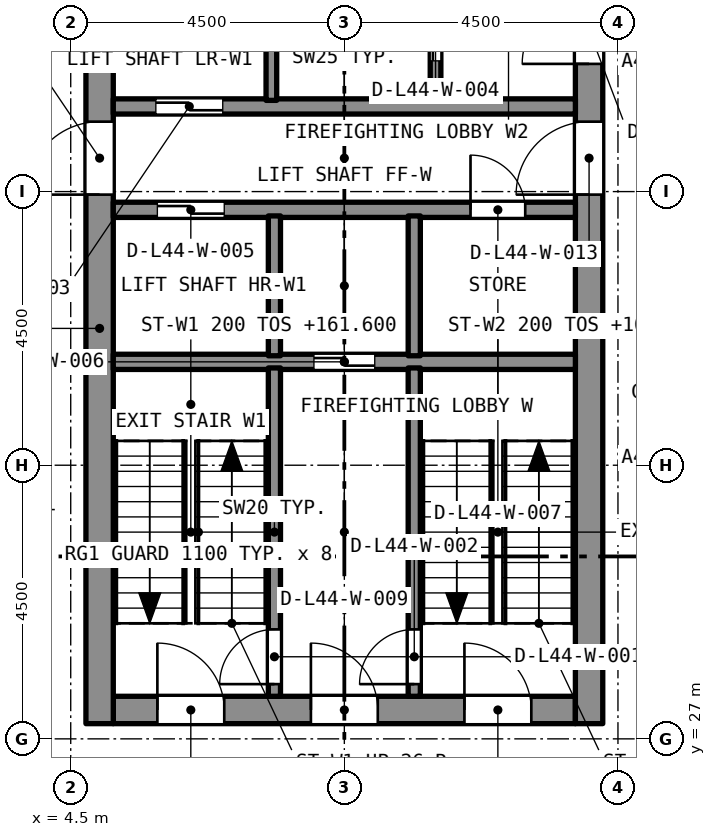
"""IFC4 building model, lengths in metres.
Left out: names, types, materials, properties, quantities, classifications, styles, units other than length and angle.
Written with IfcOpenShell. Run it as: python <this file> out.ifc"""

import sys

from ifc_helpers import new_model, si_unit, direction, frame, frame_2d, origin, place, context, subcontext, project, spatial, rectangle, extrude, element, fill, save


model = new_model("IFC4")
c1 = context("Model", 3, precision=1e-05, world=origin(), true_north=direction((0.0, 1.0)))
c2 = subcontext(c1, "Body", "Model", "MODEL_VIEW")
j1 = project(units=[si_unit("LENGTHUNIT", "METRE"), si_unit("PLANEANGLEUNIT", "RADIAN")], contexts=[c1])
p1 = place(None, origin())
s1 = spatial("IfcSite", under=j1, at=p1, CompositionType="ELEMENT")
p2 = place(p1, origin())
s2 = spatial("IfcBuilding", under=s1, at=p2, CompositionType="ELEMENT")
p3 = place(p2, frame((0.0, 0.0, 159.4)))
s3 = spatial("IfcBuildingStorey", under=s2, at=p3, CompositionType="ELEMENT", Elevation=159.4)
p4 = place(p3, frame((5.2, 27.475, 0.0), z_axis=(0.0, 0.0, 1.0), x_axis=(1.0, 0.0, 0.0)))
e1 = element("IfcWall", 1, at=p4, inside=s3, PredefinedType="SOLIDWALL", context=c2, shape_type="SweptSolid", body=[
    extrude(rectangle(XDim=7.6, YDim=0.45, at=frame_2d((3.8, 0.0))), origin(), (0.0, 0.0, 1.0), 4.4),
])
p5 = place(p4, frame((0.725, 0.0, 0.0)))
e2 = element("IfcOpeningElement", 2, at=p5, cuts=e1, PredefinedType="OPENING", context=c2, shape_type="SweptSolid", body=[
    extrude(rectangle(XDim=1.1, YDim=2.1, at=frame_2d((0.55, 1.05))), frame((0.0, 0.235, 0.0), z_axis=(0.0, -1.0, 0.0), x_axis=(1.0, 0.0, 0.0)), (0.0, 0.0, 1.0), 0.47),
])
p6 = place(p4, frame((3.25, 0.0, 0.0)))
e3 = element("IfcOpeningElement", 3, at=p6, cuts=e1, PredefinedType="OPENING", context=c2, shape_type="SweptSolid", body=[
    extrude(rectangle(XDim=1.1, YDim=2.1, at=frame_2d((0.55, 1.05))), frame((0.0, 0.235, 0.0), z_axis=(0.0, -1.0, 0.0), x_axis=(1.0, 0.0, 0.0)), (0.0, 0.0, 1.0), 0.47),
])
p7 = place(p4, frame((5.775, 0.0, 0.0)))
e4 = element("IfcOpeningElement", 4, at=p7, cuts=e1, PredefinedType="OPENING", context=c2, shape_type="SweptSolid", body=[
    extrude(rectangle(XDim=1.1, YDim=2.1, at=frame_2d((0.55, 1.05))), frame((0.0, 0.235, 0.0), z_axis=(0.0, -1.0, 0.0), x_axis=(1.0, 0.0, 0.0)), (0.0, 0.0, 1.0), 0.47),
])
p8 = place(p3, frame((4.975, 27.25, 0.0), z_axis=(0.0, 0.0, 1.0), x_axis=(0.0, 1.0, 0.0)))
e5 = element("IfcWall", 5, at=p8, inside=s3, PredefinedType="SOLIDWALL", context=c2, shape_type="SweptSolid", body=[
    extrude(rectangle(XDim=13.0, YDim=0.45, at=frame_2d((6.5, 0.0))), origin(), (0.0, 0.0, 1.0), 4.4),
])
p9 = place(p8, frame((8.7, 0.0, 0.0)))
e6 = element("IfcOpeningElement", 6, at=p9, cuts=e5, PredefinedType="OPENING", context=c2, shape_type="SweptSolid", body=[
    extrude(rectangle(XDim=1.2, YDim=2.1, at=frame_2d((0.6, 1.05))), frame((0.0, 0.235, 0.0), z_axis=(0.0, -1.0, 0.0), x_axis=(1.0, 0.0, 0.0)), (0.0, 0.0, 1.0), 0.47),
])
p10 = place(p3, frame((13.025, 27.25, 0.0), z_axis=(0.0, 0.0, 1.0), x_axis=(0.0, 1.0, 0.0)))
e7 = element("IfcWall", 7, at=p10, inside=s3, PredefinedType="SOLIDWALL", context=c2, shape_type="SweptSolid", body=[
    extrude(rectangle(XDim=13.0, YDim=0.45, at=frame_2d((6.5, 0.0))), origin(), (0.0, 0.0, 1.0), 4.4),
])
p11 = place(p10, frame((10.85, 0.0, 0.0)))
e8 = element("IfcOpeningElement", 8, at=p11, cuts=e7, PredefinedType="OPENING", context=c2, shape_type="SweptSolid", body=[
    extrude(rectangle(XDim=1.1, YDim=2.1, at=frame_2d((0.55, 1.05))), frame((0.0, 0.235, 0.0), z_axis=(0.0, -1.0, 0.0), x_axis=(1.0, 0.0, 0.0)), (0.0, 0.0, 1.0), 0.47),
])
p12 = place(p10, frame((8.7, 0.0, 0.0)))
e9 = element("IfcOpeningElement", 9, at=p12, cuts=e7, PredefinedType="OPENING", context=c2, shape_type="SweptSolid", body=[
    extrude(rectangle(XDim=1.2, YDim=2.1, at=frame_2d((0.6, 1.05))), frame((0.0, 0.235, 0.0), z_axis=(0.0, -1.0, 0.0), x_axis=(1.0, 0.0, 0.0)), (0.0, 0.0, 1.0), 0.47),
])
p13 = place(p3, frame((5.2, 33.2, 0.0), z_axis=(0.0, 0.0, 1.0), x_axis=(1.0, 0.0, 0.0)))
e10 = element("IfcWall", 10, at=p13, inside=s3, PredefinedType="SOLIDWALL", context=c2, shape_type="SweptSolid", body=[
    extrude(rectangle(XDim=7.6, YDim=0.25, at=frame_2d((3.8, 0.0))), origin(), (0.0, 0.0, 1.0), 4.1),
])
p14 = place(p13, frame((3.3, 0.0, 0.0)))
e11 = element("IfcOpeningElement", 11, at=p14, cuts=e10, PredefinedType="OPENING", context=c2, shape_type="SweptSolid", body=[
    extrude(rectangle(XDim=1.0, YDim=2.1, at=frame_2d((0.5, 1.05))), frame((0.0, 0.135, 0.0), z_axis=(0.0, -1.0, 0.0), x_axis=(1.0, 0.0, 0.0)), (0.0, 0.0, 1.0), 0.27),
])
p15 = place(p3, frame((5.2, 35.7, 0.0), z_axis=(0.0, 0.0, 1.0), x_axis=(1.0, 0.0, 0.0)))
e12 = element("IfcWall", 12, at=p15, inside=s3, PredefinedType="SOLIDWALL", context=c2, shape_type="SweptSolid", body=[
    extrude(rectangle(XDim=7.6, YDim=0.25, at=frame_2d((3.8, 0.0))), origin(), (0.0, 0.0, 1.0), 4.1),
])
p16 = place(p15, frame((0.725, 0.0, 0.0)))
e13 = element("IfcOpeningElement", 13, at=p16, cuts=e12, PredefinedType="OPENING", context=c2, shape_type="SweptSolid", body=[
    extrude(rectangle(XDim=1.1, YDim=2.4, at=frame_2d((0.55, 1.2))), frame((0.0, 0.135, 0.0), z_axis=(0.0, -1.0, 0.0), x_axis=(1.0, 0.0, 0.0)), (0.0, 0.0, 1.0), 0.27),
])
p17 = place(p15, frame((5.875, 0.0, 0.0)))
e14 = element("IfcOpeningElement", 14, at=p17, cuts=e12, PredefinedType="OPENING", context=c2, shape_type="SweptSolid", body=[
    extrude(rectangle(XDim=0.9, YDim=2.1, at=frame_2d((0.45, 1.05))), frame((0.0, 0.135, 0.0), z_axis=(0.0, -1.0, 0.0), x_axis=(1.0, 0.0, 0.0)), (0.0, 0.0, 1.0), 0.27),
])
p18 = place(p3, frame((5.2, 37.4, 0.0), z_axis=(0.0, 0.0, 1.0), x_axis=(1.0, 0.0, 0.0)))
e15 = element("IfcWall", 15, at=p18, inside=s3, PredefinedType="SOLIDWALL", context=c2, shape_type="SweptSolid", body=[
    extrude(rectangle(XDim=7.6, YDim=0.25, at=frame_2d((3.8, 0.0))), origin(), (0.0, 0.0, 1.0), 4.1),
])
p19 = place(p18, frame((0.7, 0.0, 0.0)))
e16 = element("IfcOpeningElement", 16, at=p19, cuts=e15, PredefinedType="OPENING", context=c2, shape_type="SweptSolid", body=[
    extrude(rectangle(XDim=1.1, YDim=2.4, at=frame_2d((0.55, 1.2))), frame((0.0, 0.135, 0.0), z_axis=(0.0, -1.0, 0.0), x_axis=(1.0, 0.0, 0.0)), (0.0, 0.0, 1.0), 0.27),
])
p20 = place(p3, frame((7.85, 27.7, 0.0), z_axis=(0.0, 0.0, 1.0), x_axis=(0.0, 1.0, 0.0)))
e17 = element("IfcWall", 17, at=p20, inside=s3, PredefinedType="SOLIDWALL", context=c2, shape_type="SweptSolid", body=[
    extrude(rectangle(XDim=5.4, YDim=0.2, at=frame_2d((2.7, 0.0))), origin(), (0.0, 0.0, 1.0), 4.1),
])
p21 = place(p20, frame((0.2, 0.0, 0.0)))
e18 = element("IfcOpeningElement", 18, at=p21, cuts=e17, PredefinedType="OPENING", context=c2, shape_type="SweptSolid", body=[
    extrude(rectangle(XDim=0.9, YDim=2.1, at=frame_2d((0.45, 1.05))), frame((0.0, 0.11, 0.0), z_axis=(0.0, -1.0, 0.0), x_axis=(1.0, 0.0, 0.0)), (0.0, 0.0, 1.0), 0.22),
])
p22 = place(p3, frame((10.15, 27.7, 0.0), z_axis=(0.0, 0.0, 1.0), x_axis=(0.0, 1.0, 0.0)))
e19 = element("IfcWall", 19, at=p22, inside=s3, PredefinedType="SOLIDWALL", context=c2, shape_type="SweptSolid", body=[
    extrude(rectangle(XDim=5.4, YDim=0.2, at=frame_2d((2.7, 0.0))), origin(), (0.0, 0.0, 1.0), 4.1),
])
p23 = place(p22, frame((0.2, 0.0, 0.0)))
e20 = element("IfcOpeningElement", 20, at=p23, cuts=e19, PredefinedType="OPENING", context=c2, shape_type="SweptSolid", body=[
    extrude(rectangle(XDim=0.9, YDim=2.1, at=frame_2d((0.45, 1.05))), frame((0.0, 0.11, 0.0), z_axis=(0.0, -1.0, 0.0), x_axis=(1.0, 0.0, 0.0)), (0.0, 0.0, 1.0), 0.22),
])
for number, where, z_axis, x_axis in (
    (21, (7.85, 33.3, 0.0), (0.0, 0.0, 1.0), (0.0, 1.0, 0.0)),
    (22, (10.15, 33.3, 0.0), (0.0, 0.0, 1.0), (0.0, 1.0, 0.0)),
):
    element("IfcWall", number, at=place(p3, frame(where, z_axis=z_axis, x_axis=x_axis)), inside=s3, PredefinedType="SOLIDWALL", context=c2, shape_type="SweptSolid", body=[
        extrude(rectangle(XDim=2.3, YDim=0.2, at=frame_2d((1.15, 0.0))), origin(), (0.0, 0.0, 1.0), 4.1),
    ])
p24 = place(p3, frame((7.8, 37.5, 0.0), z_axis=(0.0, 0.0, 1.0), x_axis=(0.0, 1.0, 0.0)))
e23 = element("IfcWall", 23, at=p24, inside=s3, PredefinedType="SOLIDWALL", context=c2, shape_type="SweptSolid", body=[
    extrude(rectangle(XDim=2.3, YDim=0.175, at=frame_2d((1.15, 0.0))), origin(), (0.0, 0.0, 1.0), 4.1),
])
p25 = place(p3, frame((10.5, 37.5, 0.0), z_axis=(0.0, 0.0, 1.0), x_axis=(0.0, 1.0, 0.0)))
e24 = element("IfcWall", 24, at=p25, inside=s3, PredefinedType="SOLIDWALL", context=c2, shape_type="SweptSolid", body=[
    extrude(rectangle(XDim=2.3, YDim=0.175, at=frame_2d((1.15, 0.0))), origin(), (0.0, 0.0, 1.0), 4.1),
])
p26 = place(p25, frame((0.65, 0.0, 0.0)))
e25 = element("IfcOpeningElement", 25, at=p26, cuts=e24, PredefinedType="OPENING", context=c2, shape_type="SweptSolid", body=[
    extrude(rectangle(XDim=1.0, YDim=2.1, at=frame_2d((0.5, 1.05))), frame((0.0, 0.097, 0.0), z_axis=(0.0, -1.0, 0.0), x_axis=(1.0, 0.0, 0.0)), (0.0, 0.0, 1.0), 0.195),
])
p27 = place(p21, origin())
e26 = element("IfcDoor", 26, at=p27, inside=s3, OperationType="SINGLE_SWING_LEFT", PredefinedType="DOOR", context=c2, shape_type="SweptSolid", body=[
    extrude(rectangle(XDim=0.9, YDim=2.1, at=frame_2d((0.45, 1.05))), frame((0.0, 0.025, 0.0), z_axis=(0.0, -1.0, 0.0), x_axis=(1.0, 0.0, 0.0)), (0.0, 0.0, 1.0), 0.05),
])
fill(e18, e26)
p28 = place(p23, origin())
e27 = element("IfcDoor", 27, at=p28, inside=s3, OperationType="SINGLE_SWING_LEFT", PredefinedType="DOOR", context=c2, shape_type="SweptSolid", body=[
    extrude(rectangle(XDim=0.9, YDim=2.1, at=frame_2d((0.45, 1.05))), frame((0.0, 0.025, 0.0), z_axis=(0.0, -1.0, 0.0), x_axis=(1.0, 0.0, 0.0)), (0.0, 0.0, 1.0), 0.05),
])
fill(e20, e27)
p29 = place(p19, origin())
e28 = element("IfcDoor", 28, at=p29, inside=s3, OperationType="SLIDING_TO_LEFT", PredefinedType="DOOR", context=c2, shape_type="SweptSolid", body=[
    extrude(rectangle(XDim=1.1, YDim=2.4, at=frame_2d((0.55, 1.2))), frame((0.0, 0.025, 0.0), z_axis=(0.0, -1.0, 0.0), x_axis=(1.0, 0.0, 0.0)), (0.0, 0.0, 1.0), 0.05),
])
fill(e16, e28)
p30 = place(p26, origin())
e29 = element("IfcDoor", 29, at=p30, inside=s3, OperationType="SLIDING_TO_LEFT", PredefinedType="DOOR", context=c2, shape_type="SweptSolid", body=[
    extrude(rectangle(XDim=1.0, YDim=2.1, at=frame_2d((0.5, 1.05))), frame((0.0, 0.025, 0.0), z_axis=(0.0, -1.0, 0.0), x_axis=(1.0, 0.0, 0.0)), (0.0, 0.0, 1.0), 0.05),
])
fill(e25, e29)
p31 = place(p16, origin())
e30 = element("IfcDoor", 30, at=p31, inside=s3, OperationType="SLIDING_TO_LEFT", PredefinedType="DOOR", context=c2, shape_type="SweptSolid", body=[
    extrude(rectangle(XDim=1.1, YDim=2.4, at=frame_2d((0.55, 1.2))), frame((0.0, 0.025, 0.0), z_axis=(0.0, -1.0, 0.0), x_axis=(1.0, 0.0, 0.0)), (0.0, 0.0, 1.0), 0.05),
])
fill(e13, e30)
p32 = place(p14, origin())
e31 = element("IfcDoor", 31, at=p32, inside=s3, OperationType="SLIDING_TO_LEFT", PredefinedType="DOOR", context=c2, shape_type="SweptSolid", body=[
    extrude(rectangle(XDim=1.0, YDim=2.1, at=frame_2d((0.5, 1.05))), frame((0.0, 0.025, 0.0), z_axis=(0.0, -1.0, 0.0), x_axis=(1.0, 0.0, 0.0)), (0.0, 0.0, 1.0), 0.05),
])
fill(e11, e31)
p33 = place(p17, origin())
e32 = element("IfcDoor", 32, at=p33, inside=s3, OperationType="SINGLE_SWING_LEFT", PredefinedType="DOOR", context=c2, shape_type="SweptSolid", body=[
    extrude(rectangle(XDim=0.9, YDim=2.1, at=frame_2d((0.45, 1.05))), frame((0.0, 0.025, 0.0), z_axis=(0.0, -1.0, 0.0), x_axis=(1.0, 0.0, 0.0)), (0.0, 0.0, 1.0), 0.05),
])
fill(e14, e32)
p34 = place(p5, origin())
e33 = element("IfcDoor", 33, at=p34, inside=s3, OperationType="SINGLE_SWING_LEFT", PredefinedType="DOOR", context=c2, shape_type="SweptSolid", body=[
    extrude(rectangle(XDim=1.1, YDim=2.1, at=frame_2d((0.55, 1.05))), frame((0.0, 0.025, 0.0), z_axis=(0.0, -1.0, 0.0), x_axis=(1.0, 0.0, 0.0)), (0.0, 0.0, 1.0), 0.05),
])
fill(e2, e33)
p35 = place(p6, origin())
e34 = element("IfcDoor", 34, at=p35, inside=s3, OperationType="SINGLE_SWING_LEFT", PredefinedType="DOOR", context=c2, shape_type="SweptSolid", body=[
    extrude(rectangle(XDim=1.1, YDim=2.1, at=frame_2d((0.55, 1.05))), frame((0.0, 0.025, 0.0), z_axis=(0.0, -1.0, 0.0), x_axis=(1.0, 0.0, 0.0)), (0.0, 0.0, 1.0), 0.05),
])
fill(e3, e34)
p36 = place(p7, origin())
e35 = element("IfcDoor", 35, at=p36, inside=s3, OperationType="SINGLE_SWING_LEFT", PredefinedType="DOOR", context=c2, shape_type="SweptSolid", body=[
    extrude(rectangle(XDim=1.1, YDim=2.1, at=frame_2d((0.55, 1.05))), frame((0.0, 0.025, 0.0), z_axis=(0.0, -1.0, 0.0), x_axis=(1.0, 0.0, 0.0)), (0.0, 0.0, 1.0), 0.05),
])
fill(e4, e35)
p37 = place(p11, origin())
e36 = element("IfcDoor", 36, at=p37, inside=s3, OperationType="SINGLE_SWING_LEFT", PredefinedType="DOOR", context=c2, shape_type="SweptSolid", body=[
    extrude(rectangle(XDim=1.1, YDim=2.1, at=frame_2d((0.55, 1.05))), frame((0.0, 0.025, 0.0), z_axis=(0.0, -1.0, 0.0), x_axis=(1.0, 0.0, 0.0)), (0.0, 0.0, 1.0), 0.05),
])
fill(e8, e36)
p38 = place(p9, origin())
e37 = element("IfcDoor", 37, at=p38, inside=s3, OperationType="SINGLE_SWING_LEFT", PredefinedType="DOOR", context=c2, shape_type="SweptSolid", body=[
    extrude(rectangle(XDim=1.2, YDim=2.1, at=frame_2d((0.6, 1.05))), frame((0.0, 0.025, 0.0), z_axis=(0.0, -1.0, 0.0), x_axis=(1.0, 0.0, 0.0)), (0.0, 0.0, 1.0), 0.05),
])
fill(e6, e37)
p39 = place(p12, origin())
e38 = element("IfcDoor", 38, at=p39, inside=s3, OperationType="SINGLE_SWING_LEFT", PredefinedType="DOOR", context=c2, shape_type="SweptSolid", body=[
    extrude(rectangle(XDim=1.2, YDim=2.1, at=frame_2d((0.6, 1.05))), frame((0.0, 0.025, 0.0), z_axis=(0.0, -1.0, 0.0), x_axis=(1.0, 0.0, 0.0)), (0.0, 0.0, 1.0), 0.05),
])
fill(e9, e38)
save(model, sys.argv[1])
